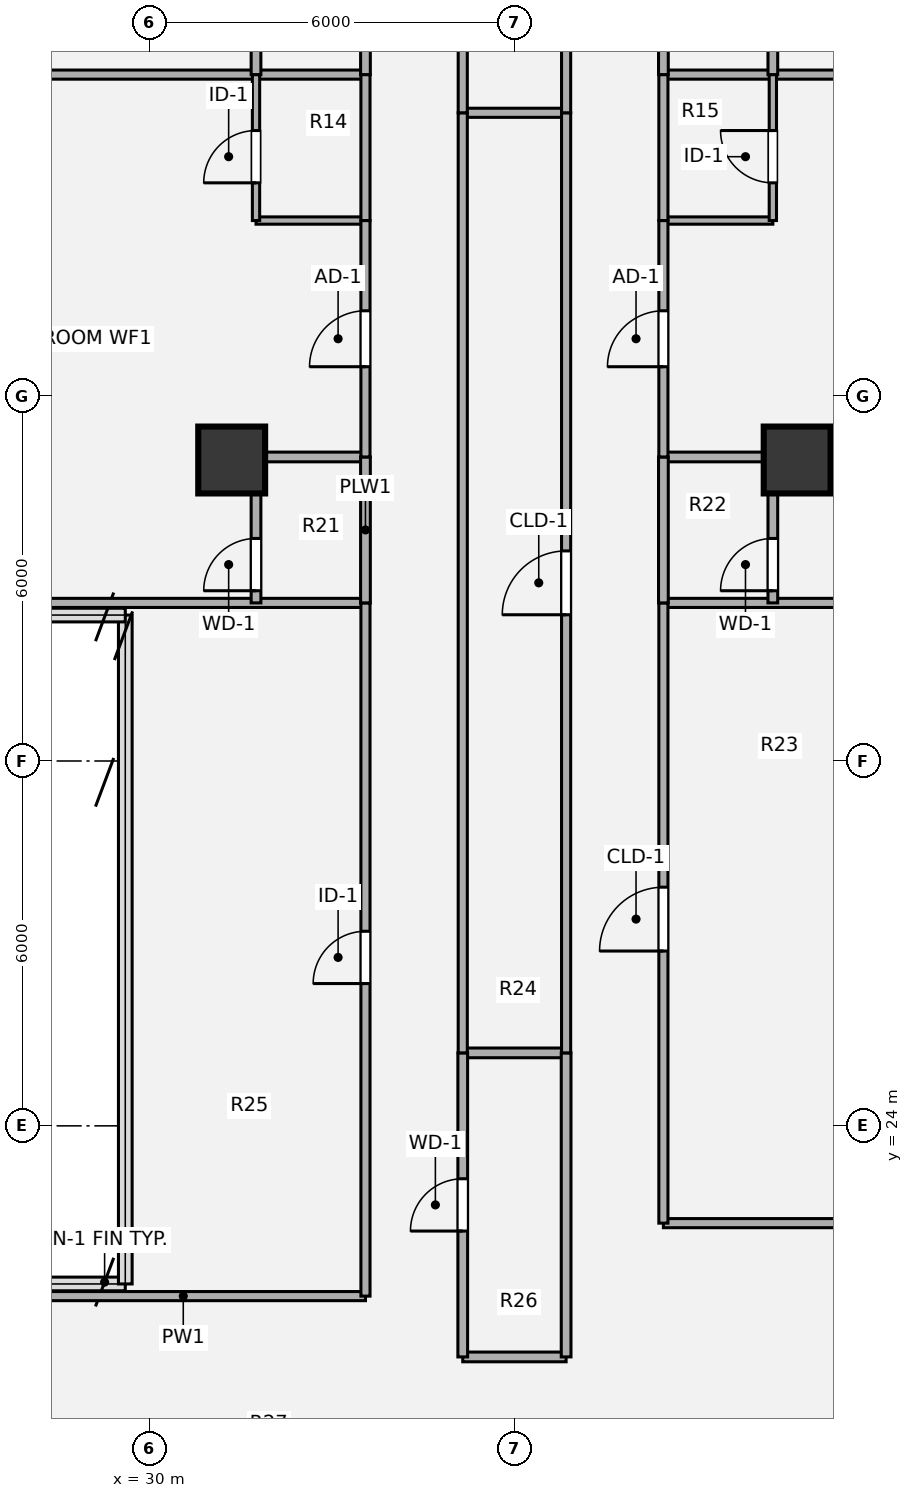
"""IFC4 building model, lengths in metres.
Left out: names, types, materials, properties, quantities, classifications, styles, units other than length and angle.
Written with IfcOpenShell. Run it as: python <this file> out.ifc"""

import sys

from ifc_helpers import new_model, si_unit, direction, frame, frame_2d, origin, origin_2d, place, context, subcontext, project, spatial, rectangle, hollow_circle, extrude, source, transform, mapped, element, fill, save


model = new_model("IFC4")
c1 = context("Model", 3, precision=1e-05, world=origin(), true_north=direction((0.0, 1.0)))
c2 = subcontext(c1, "Body", "Model", "MODEL_VIEW")
j1 = project(units=[si_unit("LENGTHUNIT", "METRE"), si_unit("PLANEANGLEUNIT", "RADIAN")], contexts=[c1])
p1 = place(None, origin())
s1 = spatial("IfcSite", under=j1, at=p1, CompositionType="ELEMENT")
p2 = place(p1, origin())
s2 = spatial("IfcBuilding", under=s1, at=p2, CompositionType="ELEMENT")
p3 = place(p2, frame((0.0, 0.0, 160.2)))
s3 = spatial("IfcBuildingStorey", under=s2, at=p3, CompositionType="ELEMENT", Elevation=160.2)
m1 = source(origin(), c2, "Body", "SweptSolid", [
    extrude(hollow_circle(Radius=0.55, WallThickness=0.04, at=origin_2d()), origin(), (0.0, 0.0, 1.0), 3.78),
])
for number, where, z_axis, x_axis in (
    (1, (31.35, 34.95, 0.0), (0.0, 0.0, 1.0), (1.0, 0.0, 0.0)),
    (2, (40.65, 34.95, 0.0), (0.0, 0.0, 1.0), (1.0, 0.0, 0.0)),
):
    element("IfcColumn", number, at=place(p3, frame(where, z_axis=z_axis, x_axis=x_axis)), inside=s3, PredefinedType="COLUMN", context=c2, shape_type="MappedRepresentation", body=[
        mapped(m1, transform((0.0, 0.0, 0.0), x_axis=(1.0, 0.0, 0.0), y_axis=(0.0, 1.0, 0.0), z_axis=(0.0, 0.0, 1.0), scale=1.0)),
    ])
p4 = place(p3, frame((35.15, 20.2, 0.0), z_axis=(0.0, 0.0, 1.0), x_axis=(1.0, 0.0, 0.0)))
e3 = element("IfcWall", 3, at=p4, inside=s3, PredefinedType="PLUMBINGWALL", context=c2, shape_type="SweptSolid", body=[
    extrude(rectangle(XDim=1.7, YDim=0.16, at=frame_2d((0.85, 0.0))), origin(), (0.0, 0.0, 1.0), 3.5),
])
p5 = place(p3, frame((27.558, 21.2, 0.0), z_axis=(0.0, 0.0, 1.0), x_axis=(1.0, 0.0, 0.0)))
e4 = element("IfcWall", 4, at=p5, inside=s3, PredefinedType="PARTITIONING", context=c2, shape_type="SweptSolid", body=[
    extrude(rectangle(XDim=5.992, YDim=0.15, at=frame_2d((2.996, 0.0))), origin(), (0.0, 0.0, 1.0), 3.5),
])
p6 = place(p3, frame((38.45, 22.4, 0.0), z_axis=(0.0, 0.0, 1.0), x_axis=(1.0, 0.0, 0.0)))
e5 = element("IfcWall", 5, at=p6, inside=s3, PredefinedType="PARTITIONING", context=c2, shape_type="SweptSolid", body=[
    extrude(rectangle(XDim=3.87, YDim=0.15, at=frame_2d((1.935, 0.0))), origin(), (0.0, 0.0, 1.0), 3.5),
])
p7 = place(p3, frame((35.15, 25.2, 0.0), z_axis=(0.0, 0.0, 1.0), x_axis=(1.0, 0.0, 0.0)))
e6 = element("IfcWall", 6, at=p7, inside=s3, PredefinedType="PLUMBINGWALL", context=c2, shape_type="SweptSolid", body=[
    extrude(rectangle(XDim=1.7, YDim=0.16, at=frame_2d((0.85, 0.0))), origin(), (0.0, 0.0, 1.0), 3.5),
])
p8 = place(p3, frame((27.557, 32.6, 0.0), z_axis=(0.0, 0.0, 1.0), x_axis=(1.0, 0.0, 0.0)))
e7 = element("IfcWall", 7, at=p8, inside=s3, PredefinedType="PARTITIONING", context=c2, shape_type="SweptSolid", body=[
    extrude(rectangle(XDim=5.993, YDim=0.15, at=frame_2d((2.997, 0.0))), origin(), (0.0, 0.0, 1.0), 3.5),
])
p9 = place(p3, frame((38.45, 32.6, 0.0), z_axis=(0.0, 0.0, 1.0), x_axis=(1.0, 0.0, 0.0)))
e8 = element("IfcWall", 8, at=p9, inside=s3, PredefinedType="PARTITIONING", context=c2, shape_type="SweptSolid", body=[
    extrude(rectangle(XDim=5.993, YDim=0.15, at=frame_2d((2.997, 0.0))), origin(), (0.0, 0.0, 1.0), 3.5),
])
for number, where, z_axis, x_axis in (
    (9, (31.75, 35.0, 0.0), (0.0, 0.0, 1.0), (1.0, 0.0, 0.0)),
    (10, (38.45, 35.0, 0.0), (0.0, 0.0, 1.0), (1.0, 0.0, 0.0)),
):
    element("IfcWall", number, at=place(p3, frame(where, z_axis=z_axis, x_axis=x_axis)), inside=s3, PredefinedType="PLUMBINGWALL", context=c2, shape_type="SweptSolid", body=[
        extrude(rectangle(XDim=1.8, YDim=0.16, at=frame_2d((0.9, 0.0))), origin(), (0.0, 0.0, 1.0), 2.903),
    ])
for number, where, z_axis, x_axis in (
    (11, (31.75, 38.888, 0.0), (0.0, 0.0, 1.0), (1.0, 0.0, 0.0)),
    (12, (38.45, 38.888, 0.0), (0.0, 0.0, 1.0), (1.0, 0.0, 0.0)),
):
    element("IfcWall", number, at=place(p3, frame(where, z_axis=z_axis, x_axis=x_axis)), inside=s3, PredefinedType="PARTITIONING", context=c2, shape_type="SweptSolid", body=[
        extrude(rectangle(XDim=1.8, YDim=0.12, at=frame_2d((0.9, 0.0))), origin(), (0.0, 0.0, 1.0), 3.259),
    ])
p10 = place(p3, frame((35.15, 40.66, 0.0), z_axis=(0.0, 0.0, 1.0), x_axis=(1.0, 0.0, 0.0)))
e13 = element("IfcWall", 13, at=p10, inside=s3, PredefinedType="PARTITIONING", context=c2, shape_type="SweptSolid", body=[
    extrude(rectangle(XDim=1.7, YDim=0.15, at=frame_2d((0.85, 0.0))), origin(), (0.0, 0.0, 1.0), 3.259),
])
for number, where, z_axis, x_axis in (
    (14, (15.88, 41.288, 0.0), (0.0, 0.0, 1.0), (1.0, 0.0, 0.0)),
    (15, (38.45, 41.288, 0.0), (0.0, 0.0, 1.0), (1.0, 0.0, 0.0)),
):
    element("IfcWall", number, at=place(p3, frame(where, z_axis=z_axis, x_axis=x_axis)), inside=s3, PredefinedType="PARTITIONING", context=c2, shape_type="SweptSolid", body=[
        extrude(rectangle(XDim=17.67, YDim=0.15, at=frame_2d((8.835, 0.0))), origin(), (0.0, 0.0, 1.0), 2.982),
    ])
p11 = place(p3, frame((31.75, 32.6, 0.0), z_axis=(0.0, 0.0, 1.0), x_axis=(0.0, 1.0, 0.0)))
e16 = element("IfcWall", 16, at=p11, inside=s3, PredefinedType="PLUMBINGWALL", context=c2, shape_type="SweptSolid", body=[
    extrude(rectangle(XDim=2.4, YDim=0.16, at=frame_2d((1.2, 0.0))), origin(), (0.0, 0.0, 1.0), 3.5),
])
p12 = place(p11, frame((0.2, 0.0, 0.0)))
e17 = element("IfcOpeningElement", 17, at=p12, cuts=e16, PredefinedType="OPENING", context=c2, shape_type="SweptSolid", body=[
    extrude(rectangle(XDim=0.86, YDim=2.1, at=origin_2d()), frame((0.43, 0.09, 1.05), z_axis=(0.0, -1.0, 0.0), x_axis=(1.0, 0.0, 0.0)), (0.0, 0.0, 1.0), 0.18),
])
p13 = place(p3, frame((31.75, 38.888, 0.0), z_axis=(0.0, 0.0, 1.0), x_axis=(0.0, 1.0, 0.0)))
e18 = element("IfcWall", 18, at=p13, inside=s3, PredefinedType="PARTITIONING", context=c2, shape_type="SweptSolid", body=[
    extrude(rectangle(XDim=2.4, YDim=0.12, at=frame_2d((1.2, 0.0))), origin(), (0.0, 0.0, 1.0), 3.5),
])
p14 = place(p13, frame((0.62, 0.0, 0.0)))
e19 = element("IfcOpeningElement", 19, at=p14, cuts=e18, PredefinedType="OPENING", context=c2, shape_type="SweptSolid", body=[
    extrude(rectangle(XDim=0.86, YDim=2.1, at=origin_2d()), frame((0.43, 0.07, 1.05), z_axis=(0.0, -1.0, 0.0), x_axis=(1.0, 0.0, 0.0)), (0.0, 0.0, 1.0), 0.14),
])
p15 = place(p3, frame((31.75, 41.288, 0.0), z_axis=(0.0, 0.0, 1.0), x_axis=(0.0, 1.0, 0.0)))
e20 = element("IfcWall", 20, at=p15, inside=s3, PredefinedType="PLUMBINGWALL", context=c2, shape_type="SweptSolid", body=[
    extrude(rectangle(XDim=2.4, YDim=0.16, at=frame_2d((1.2, 0.0))), origin(), (0.0, 0.0, 1.0), 3.5),
])
p16 = place(p15, frame((0.6, 0.0, 0.0)))
e21 = element("IfcOpeningElement", 21, at=p16, cuts=e20, PredefinedType="OPENING", context=c2, shape_type="SweptSolid", body=[
    extrude(rectangle(XDim=0.86, YDim=2.1, at=origin_2d()), frame((0.43, 0.09, 1.05), z_axis=(0.0, -1.0, 0.0), x_axis=(1.0, 0.0, 0.0)), (0.0, 0.0, 1.0), 0.18),
])
p17 = place(p3, frame((33.55, 21.2, 0.0), z_axis=(0.0, 0.0, 1.0), x_axis=(0.0, 1.0, 0.0)))
e22 = element("IfcWall", 22, at=p17, inside=s3, PredefinedType="PARTITIONING", context=c2, shape_type="SweptSolid", body=[
    extrude(rectangle(XDim=11.4, YDim=0.15, at=frame_2d((5.7, 0.0))), origin(), (0.0, 0.0, 1.0), 3.5),
])
p18 = place(p17, frame((5.14, 0.0, 0.0)))
e23 = element("IfcOpeningElement", 23, at=p18, cuts=e22, PredefinedType="OPENING", context=c2, shape_type="SweptSolid", body=[
    extrude(rectangle(XDim=0.86, YDim=2.1, at=origin_2d()), frame((0.43, 0.085, 1.05), z_axis=(0.0, -1.0, 0.0), x_axis=(1.0, 0.0, 0.0)), (0.0, 0.0, 1.0), 0.17),
])
p19 = place(p3, frame((33.55, 32.6, 0.0), z_axis=(0.0, 0.0, 1.0), x_axis=(0.0, 1.0, 0.0)))
e24 = element("IfcWall", 24, at=p19, inside=s3, PredefinedType="PLUMBINGWALL", context=c2, shape_type="SweptSolid", body=[
    extrude(rectangle(XDim=2.4, YDim=0.16, at=frame_2d((1.2, 0.0))), origin(), (0.0, 0.0, 1.0), 3.5),
])
p20 = place(p3, frame((33.55, 35.0, 0.0), z_axis=(0.0, 0.0, 1.0), x_axis=(0.0, 1.0, 0.0)))
e25 = element("IfcWall", 25, at=p20, inside=s3, PredefinedType="PARTITIONING", context=c2, shape_type="SweptSolid", body=[
    extrude(rectangle(XDim=3.888, YDim=0.15, at=frame_2d((1.944, 0.0))), origin(), (0.0, 0.0, 1.0), 3.5),
])
p21 = place(p20, frame((1.484, 0.0, 0.0)))
e26 = element("IfcOpeningElement", 26, at=p21, cuts=e25, PredefinedType="OPENING", context=c2, shape_type="SweptSolid", body=[
    extrude(rectangle(XDim=0.92, YDim=2.1, at=origin_2d()), frame((0.46, 0.085, 1.05), z_axis=(0.0, -1.0, 0.0), x_axis=(1.0, 0.0, 0.0)), (0.0, 0.0, 1.0), 0.17),
])
p22 = place(p3, frame((33.55, 38.888, 0.0), z_axis=(0.0, 0.0, 1.0), x_axis=(0.0, 1.0, 0.0)))
e27 = element("IfcWall", 27, at=p22, inside=s3, PredefinedType="PARTITIONING", context=c2, shape_type="SweptSolid", body=[
    extrude(rectangle(XDim=2.4, YDim=0.15, at=frame_2d((1.2, 0.0))), origin(), (0.0, 0.0, 1.0), 3.5),
])
p23 = place(p3, frame((33.55, 41.288, 0.0), z_axis=(0.0, 0.0, 1.0), x_axis=(0.0, 1.0, 0.0)))
e28 = element("IfcWall", 28, at=p23, inside=s3, PredefinedType="PLUMBINGWALL", context=c2, shape_type="SweptSolid", body=[
    extrude(rectangle(XDim=2.4, YDim=0.16, at=frame_2d((1.2, 0.0))), origin(), (0.0, 0.0, 1.0), 3.5),
])
p24 = place(p3, frame((35.15, 20.2, 0.0), z_axis=(0.0, 0.0, 1.0), x_axis=(0.0, 1.0, 0.0)))
e29 = element("IfcWall", 29, at=p24, inside=s3, PredefinedType="PLUMBINGWALL", context=c2, shape_type="SweptSolid", body=[
    extrude(rectangle(XDim=5.0, YDim=0.16, at=frame_2d((2.5, 0.0))), origin(), (0.0, 0.0, 1.0), 3.5),
])
p25 = place(p24, frame((2.07, 0.0, 0.0)))
e30 = element("IfcOpeningElement", 30, at=p25, cuts=e29, PredefinedType="OPENING", context=c2, shape_type="SweptSolid", body=[
    extrude(rectangle(XDim=0.86, YDim=2.1, at=origin_2d()), frame((0.43, 0.09, 1.05), z_axis=(0.0, -1.0, 0.0), x_axis=(1.0, 0.0, 0.0)), (0.0, 0.0, 1.0), 0.18),
])
p26 = place(p3, frame((35.15, 25.2, 0.0), z_axis=(0.0, 0.0, 1.0), x_axis=(0.0, 1.0, 0.0)))
e31 = element("IfcWall", 31, at=p26, inside=s3, PredefinedType="PARTITIONING", context=c2, shape_type="SweptSolid", body=[
    extrude(rectangle(XDim=15.46, YDim=0.15, at=frame_2d((7.73, 0.0))), origin(), (0.0, 0.0, 1.0), 3.5),
])
p27 = place(p3, frame((35.15, 40.66, 0.0), z_axis=(0.0, 0.0, 1.0), x_axis=(0.0, 1.0, 0.0)))
e32 = element("IfcWall", 32, at=p27, inside=s3, PredefinedType="PARTITIONING", context=c2, shape_type="SweptSolid", body=[
    extrude(rectangle(XDim=10.54, YDim=0.15, at=frame_2d((5.27, 0.0))), origin(), (0.0, 0.0, 1.0), 3.5),
])
p28 = place(p27, frame((4.81, 0.0, 0.0)))
e33 = element("IfcOpeningElement", 33, at=p28, cuts=e32, PredefinedType="OPENING", context=c2, shape_type="SweptSolid", body=[
    extrude(rectangle(XDim=0.86, YDim=2.1, at=origin_2d()), frame((0.43, 0.085, 1.05), z_axis=(0.0, -1.0, 0.0), x_axis=(1.0, 0.0, 0.0)), (0.0, 0.0, 1.0), 0.17),
])
p29 = place(p3, frame((36.85, 20.2, 0.0), z_axis=(0.0, 0.0, 1.0), x_axis=(0.0, 1.0, 0.0)))
e34 = element("IfcWall", 34, at=p29, inside=s3, PredefinedType="PLUMBINGWALL", context=c2, shape_type="SweptSolid", body=[
    extrude(rectangle(XDim=5.0, YDim=0.16, at=frame_2d((2.5, 0.0))), origin(), (0.0, 0.0, 1.0), 3.5),
])
p30 = place(p3, frame((36.85, 25.2, 0.0), z_axis=(0.0, 0.0, 1.0), x_axis=(0.0, 1.0, 0.0)))
e35 = element("IfcWall", 35, at=p30, inside=s3, PredefinedType="PARTITIONING", context=c2, shape_type="SweptSolid", body=[
    extrude(rectangle(XDim=15.46, YDim=0.15, at=frame_2d((7.73, 0.0))), origin(), (0.0, 0.0, 1.0), 3.5),
])
p31 = place(p30, frame((7.205, 0.0, 0.0)))
e36 = element("IfcOpeningElement", 36, at=p31, cuts=e35, PredefinedType="OPENING", context=c2, shape_type="SweptSolid", body=[
    extrude(rectangle(XDim=1.05, YDim=2.1, at=origin_2d()), frame((0.525, 0.085, 1.05), z_axis=(0.0, -1.0, 0.0), x_axis=(1.0, 0.0, 0.0)), (0.0, 0.0, 1.0), 0.17),
])
p32 = place(p3, frame((36.85, 40.66, 0.0), z_axis=(0.0, 0.0, 1.0), x_axis=(0.0, 1.0, 0.0)))
e37 = element("IfcWall", 37, at=p32, inside=s3, PredefinedType="PARTITIONING", context=c2, shape_type="SweptSolid", body=[
    extrude(rectangle(XDim=10.54, YDim=0.15, at=frame_2d((5.27, 0.0))), origin(), (0.0, 0.0, 1.0), 3.5),
])
p33 = place(p3, frame((38.45, 22.4, 0.0), z_axis=(0.0, 0.0, 1.0), x_axis=(0.0, 1.0, 0.0)))
e38 = element("IfcWall", 38, at=p33, inside=s3, PredefinedType="PARTITIONING", context=c2, shape_type="SweptSolid", body=[
    extrude(rectangle(XDim=10.2, YDim=0.15, at=frame_2d((5.1, 0.0))), origin(), (0.0, 0.0, 1.0), 3.5),
])
p34 = place(p33, frame((4.475, 0.0, 0.0)))
e39 = element("IfcOpeningElement", 39, at=p34, cuts=e38, PredefinedType="OPENING", context=c2, shape_type="SweptSolid", body=[
    extrude(rectangle(XDim=1.05, YDim=2.1, at=origin_2d()), frame((0.525, 0.085, 1.05), z_axis=(0.0, -1.0, 0.0), x_axis=(1.0, 0.0, 0.0)), (0.0, 0.0, 1.0), 0.17),
])
p35 = place(p3, frame((38.45, 32.6, 0.0), z_axis=(0.0, 0.0, 1.0), x_axis=(0.0, 1.0, 0.0)))
e40 = element("IfcWall", 40, at=p35, inside=s3, PredefinedType="PLUMBINGWALL", context=c2, shape_type="SweptSolid", body=[
    extrude(rectangle(XDim=2.4, YDim=0.16, at=frame_2d((1.2, 0.0))), origin(), (0.0, 0.0, 1.0), 3.5),
])
p36 = place(p3, frame((38.45, 35.0, 0.0), z_axis=(0.0, 0.0, 1.0), x_axis=(0.0, 1.0, 0.0)))
e41 = element("IfcWall", 41, at=p36, inside=s3, PredefinedType="PARTITIONING", context=c2, shape_type="SweptSolid", body=[
    extrude(rectangle(XDim=3.888, YDim=0.15, at=frame_2d((1.944, 0.0))), origin(), (0.0, 0.0, 1.0), 3.5),
])
p37 = place(p36, frame((1.484, 0.0, 0.0)))
e42 = element("IfcOpeningElement", 42, at=p37, cuts=e41, PredefinedType="OPENING", context=c2, shape_type="SweptSolid", body=[
    extrude(rectangle(XDim=0.92, YDim=2.1, at=origin_2d()), frame((0.46, 0.085, 1.05), z_axis=(0.0, -1.0, 0.0), x_axis=(1.0, 0.0, 0.0)), (0.0, 0.0, 1.0), 0.17),
])
p38 = place(p3, frame((38.45, 38.888, 0.0), z_axis=(0.0, 0.0, 1.0), x_axis=(0.0, 1.0, 0.0)))
e43 = element("IfcWall", 43, at=p38, inside=s3, PredefinedType="PARTITIONING", context=c2, shape_type="SweptSolid", body=[
    extrude(rectangle(XDim=2.4, YDim=0.15, at=frame_2d((1.2, 0.0))), origin(), (0.0, 0.0, 1.0), 3.5),
])
p39 = place(p3, frame((38.45, 41.288, 0.0), z_axis=(0.0, 0.0, 1.0), x_axis=(0.0, 1.0, 0.0)))
e44 = element("IfcWall", 44, at=p39, inside=s3, PredefinedType="PLUMBINGWALL", context=c2, shape_type="SweptSolid", body=[
    extrude(rectangle(XDim=2.4, YDim=0.16, at=frame_2d((1.2, 0.0))), origin(), (0.0, 0.0, 1.0), 3.5),
])
p40 = place(p3, frame((40.25, 32.6, 0.0), z_axis=(0.0, 0.0, 1.0), x_axis=(0.0, 1.0, 0.0)))
e45 = element("IfcWall", 45, at=p40, inside=s3, PredefinedType="PLUMBINGWALL", context=c2, shape_type="SweptSolid", body=[
    extrude(rectangle(XDim=2.4, YDim=0.16, at=frame_2d((1.2, 0.0))), origin(), (0.0, 0.0, 1.0), 3.5),
])
p41 = place(p40, frame((0.2, 0.0, 0.0)))
e46 = element("IfcOpeningElement", 46, at=p41, cuts=e45, PredefinedType="OPENING", context=c2, shape_type="SweptSolid", body=[
    extrude(rectangle(XDim=0.86, YDim=2.1, at=origin_2d()), frame((0.43, 0.09, 1.05), z_axis=(0.0, -1.0, 0.0), x_axis=(1.0, 0.0, 0.0)), (0.0, 0.0, 1.0), 0.18),
])
p42 = place(p3, frame((40.25, 38.888, 0.0), z_axis=(0.0, 0.0, 1.0), x_axis=(0.0, 1.0, 0.0)))
e47 = element("IfcWall", 47, at=p42, inside=s3, PredefinedType="PARTITIONING", context=c2, shape_type="SweptSolid", body=[
    extrude(rectangle(XDim=2.4, YDim=0.12, at=frame_2d((1.2, 0.0))), origin(), (0.0, 0.0, 1.0), 3.5),
])
p43 = place(p42, frame((0.62, 0.0, 0.0)))
e48 = element("IfcOpeningElement", 48, at=p43, cuts=e47, PredefinedType="OPENING", context=c2, shape_type="SweptSolid", body=[
    extrude(rectangle(XDim=0.86, YDim=2.1, at=origin_2d()), frame((0.43, 0.07, 1.05), z_axis=(0.0, -1.0, 0.0), x_axis=(1.0, 0.0, 0.0)), (0.0, 0.0, 1.0), 0.14),
])
p44 = place(p3, frame((40.25, 41.288, 0.0), z_axis=(0.0, 0.0, 1.0), x_axis=(0.0, 1.0, 0.0)))
e49 = element("IfcWall", 49, at=p44, inside=s3, PredefinedType="PLUMBINGWALL", context=c2, shape_type="SweptSolid", body=[
    extrude(rectangle(XDim=2.4, YDim=0.16, at=frame_2d((1.2, 0.0))), origin(), (0.0, 0.0, 1.0), 3.5),
])
p45 = place(p44, frame((0.6, 0.0, 0.0)))
e50 = element("IfcOpeningElement", 50, at=p45, cuts=e49, PredefinedType="OPENING", context=c2, shape_type="SweptSolid", body=[
    extrude(rectangle(XDim=0.86, YDim=2.1, at=origin_2d()), frame((0.43, 0.09, 1.05), z_axis=(0.0, -1.0, 0.0), x_axis=(1.0, 0.0, 0.0)), (0.0, 0.0, 1.0), 0.18),
])
m2 = source(origin(), c2, "Body", "SweptSolid", [
    extrude(rectangle(XDim=0.86, YDim=2.1, at=origin_2d()), frame((0.43, 0.025, 1.05), z_axis=(0.0, -1.0, 0.0), x_axis=(1.0, 0.0, 0.0)), (0.0, 0.0, 1.0), 0.05),
])
p46 = place(p12, origin())
e51 = element("IfcDoor", 51, at=p46, inside=s3, OperationType="SINGLE_SWING_LEFT", PredefinedType="DOOR", context=c2, shape_type="MappedRepresentation", body=[
    mapped(m2, transform((0.0, 0.0, 0.0), x_axis=(1.0, 0.0, 0.0), y_axis=(0.0, 1.0, 0.0), z_axis=(0.0, 0.0, 1.0), scale=1.0)),
])
fill(e17, e51)
m3 = source(origin(), c2, "Body", "SweptSolid", [
    extrude(rectangle(XDim=0.86, YDim=2.1, at=origin_2d()), frame((0.43, 0.025, 1.05), z_axis=(0.0, -1.0, 0.0), x_axis=(1.0, 0.0, 0.0)), (0.0, 0.0, 1.0), 0.05),
])
p47 = place(p14, origin())
e52 = element("IfcDoor", 52, at=p47, inside=s3, OperationType="SINGLE_SWING_LEFT", PredefinedType="DOOR", context=c2, shape_type="MappedRepresentation", body=[
    mapped(m3, transform((0.0, 0.0, 0.0), x_axis=(1.0, 0.0, 0.0), y_axis=(0.0, 1.0, 0.0), z_axis=(0.0, 0.0, 1.0), scale=1.0)),
])
fill(e19, e52)
p48 = place(p18, origin())
e53 = element("IfcDoor", 53, at=p48, inside=s3, OperationType="SINGLE_SWING_LEFT", PredefinedType="DOOR", context=c2, shape_type="MappedRepresentation", body=[
    mapped(m3, transform((0.0, 0.0, 0.0), x_axis=(1.0, 0.0, 0.0), y_axis=(0.0, 1.0, 0.0), z_axis=(0.0, 0.0, 1.0), scale=1.0)),
])
fill(e23, e53)
m4 = source(origin(), c2, "Body", "SweptSolid", [
    extrude(rectangle(XDim=0.92, YDim=2.1, at=origin_2d()), frame((0.46, 0.025, 1.05), z_axis=(0.0, -1.0, 0.0), x_axis=(1.0, 0.0, 0.0)), (0.0, 0.0, 1.0), 0.05),
])
p49 = place(p21, origin())
e54 = element("IfcDoor", 54, at=p49, inside=s3, OperationType="SINGLE_SWING_LEFT", PredefinedType="DOOR", context=c2, shape_type="MappedRepresentation", body=[
    mapped(m4, transform((0.0, 0.0, 0.0), x_axis=(1.0, 0.0, 0.0), y_axis=(0.0, 1.0, 0.0), z_axis=(0.0, 0.0, 1.0), scale=1.0)),
])
fill(e26, e54)
p50 = place(p25, origin())
e55 = element("IfcDoor", 55, at=p50, inside=s3, OperationType="SINGLE_SWING_LEFT", PredefinedType="DOOR", context=c2, shape_type="MappedRepresentation", body=[
    mapped(m2, transform((0.0, 0.0, 0.0), x_axis=(1.0, 0.0, 0.0), y_axis=(0.0, 1.0, 0.0), z_axis=(0.0, 0.0, 1.0), scale=1.0)),
])
fill(e30, e55)
m5 = source(origin(), c2, "Body", "SweptSolid", [
    extrude(rectangle(XDim=1.05, YDim=2.1, at=origin_2d()), frame((0.525, 0.025, 1.05), z_axis=(0.0, -1.0, 0.0), x_axis=(1.0, 0.0, 0.0)), (0.0, 0.0, 1.0), 0.05),
])
p51 = place(p31, origin())
e56 = element("IfcDoor", 56, at=p51, inside=s3, OperationType="SINGLE_SWING_LEFT", PredefinedType="DOOR", context=c2, shape_type="MappedRepresentation", body=[
    mapped(m5, transform((0.0, 0.0, 0.0), x_axis=(1.0, 0.0, 0.0), y_axis=(0.0, 1.0, 0.0), z_axis=(0.0, 0.0, 1.0), scale=1.0)),
])
fill(e36, e56)
p52 = place(p34, origin())
e57 = element("IfcDoor", 57, at=p52, inside=s3, OperationType="SINGLE_SWING_LEFT", PredefinedType="DOOR", context=c2, shape_type="MappedRepresentation", body=[
    mapped(m5, transform((0.0, 0.0, 0.0), x_axis=(1.0, 0.0, 0.0), y_axis=(0.0, 1.0, 0.0), z_axis=(0.0, 0.0, 1.0), scale=1.0)),
])
fill(e39, e57)
p53 = place(p37, origin())
e58 = element("IfcDoor", 58, at=p53, inside=s3, OperationType="SINGLE_SWING_LEFT", PredefinedType="DOOR", context=c2, shape_type="MappedRepresentation", body=[
    mapped(m4, transform((0.0, 0.0, 0.0), x_axis=(1.0, 0.0, 0.0), y_axis=(0.0, 1.0, 0.0), z_axis=(0.0, 0.0, 1.0), scale=1.0)),
])
fill(e42, e58)
p54 = place(p41, origin())
e59 = element("IfcDoor", 59, at=p54, inside=s3, OperationType="SINGLE_SWING_LEFT", PredefinedType="DOOR", context=c2, shape_type="MappedRepresentation", body=[
    mapped(m2, transform((0.0, 0.0, 0.0), x_axis=(1.0, 0.0, 0.0), y_axis=(0.0, 1.0, 0.0), z_axis=(0.0, 0.0, 1.0), scale=1.0)),
])
fill(e46, e59)
p55 = place(p43, origin())
e60 = element("IfcDoor", 60, at=p55, inside=s3, OperationType="SINGLE_SWING_RIGHT", PredefinedType="DOOR", context=c2, shape_type="MappedRepresentation", body=[
    mapped(m3, transform((0.0, 0.0, 0.0), x_axis=(1.0, 0.0, 0.0), y_axis=(0.0, 1.0, 0.0), z_axis=(0.0, 0.0, 1.0), scale=1.0)),
])
fill(e48, e60)
save(model, sys.argv[1])
